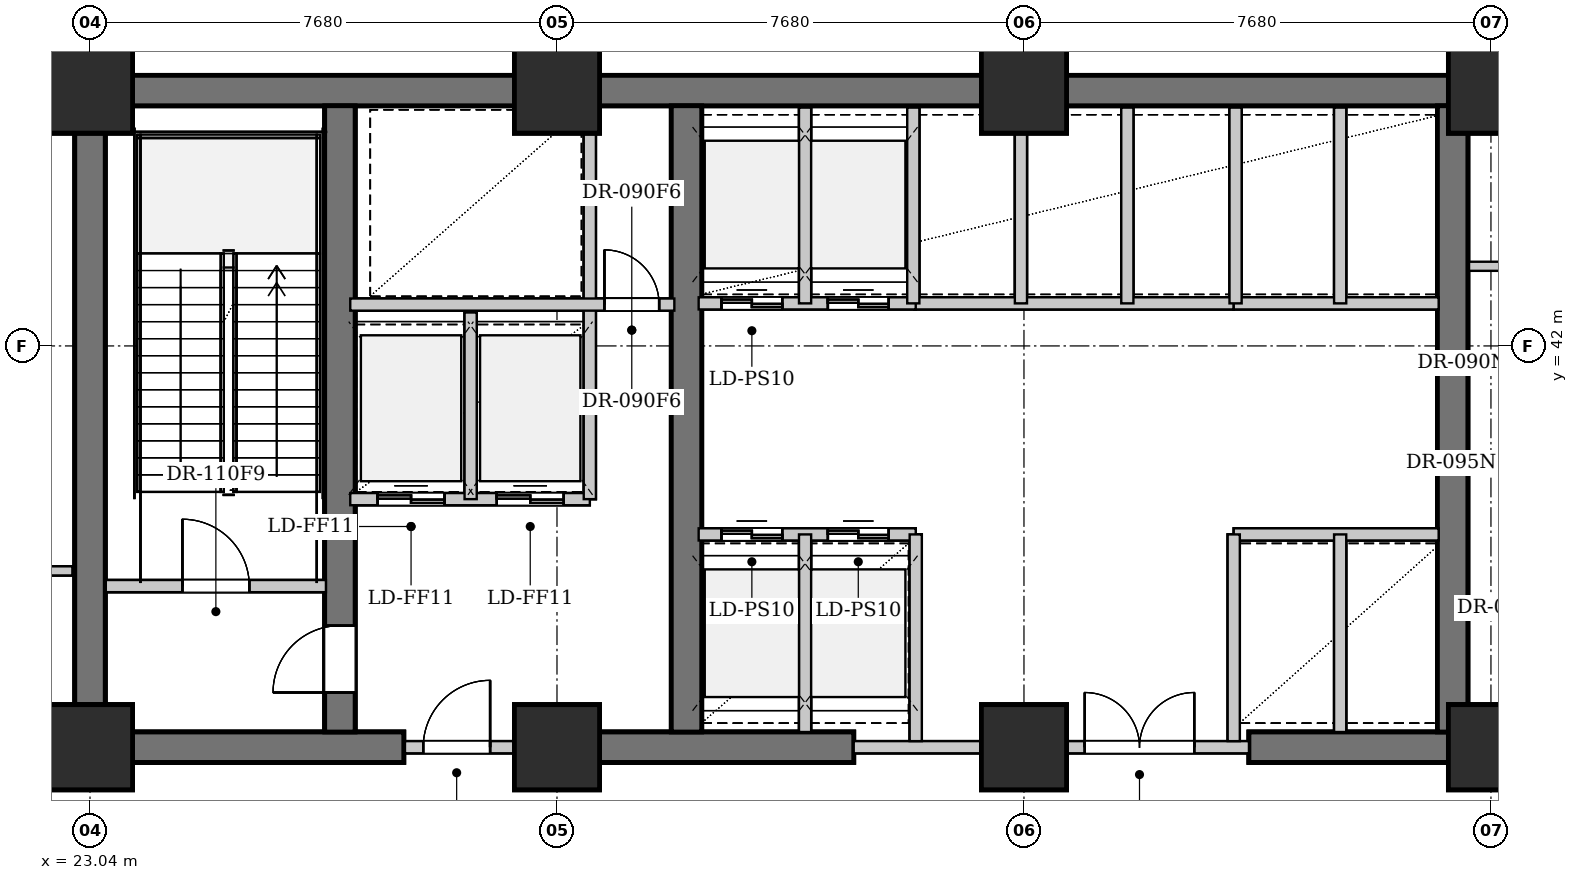
"""IFC4 building model, lengths in metres.
Left out: names, types, materials, properties, quantities, classifications, styles, units other than length and angle.
Written with IfcOpenShell. Run it as: python <this file> out.ifc"""

import sys

from ifc_helpers import new_model, si_unit, direction, frame, frame_2d, origin, origin_2d, place, context, subcontext, project, spatial, rectangle, extrude, element, fill, save


model = new_model("IFC4")
c1 = context("Model", 3, precision=1e-05, world=origin(), true_north=direction((0.0, 1.0)))
c2 = subcontext(c1, "Body", "Model", "MODEL_VIEW")
j1 = project(units=[si_unit("LENGTHUNIT", "METRE"), si_unit("PLANEANGLEUNIT", "RADIAN")], contexts=[c1])
p1 = place(None, origin())
s1 = spatial("IfcSite", under=j1, at=p1, CompositionType="ELEMENT")
p2 = place(p1, origin())
s2 = spatial("IfcBuilding", under=s1, at=p2, CompositionType="ELEMENT")
p3 = place(p2, frame((0.0, 0.0, 10.4)))
s3 = spatial("IfcBuildingStorey", under=s2, at=p3, CompositionType="ELEMENT", Elevation=10.4)
p4 = place(p3, frame((22.79, 46.2, 0.0), z_axis=(0.0, 0.0, 1.0), x_axis=(1.0, 0.0, 0.0)))
e1 = element("IfcWall", 1, at=p4, inside=s3, PredefinedType="SHEAR", context=c2, shape_type="SweptSolid", body=[
    extrude(rectangle(XDim=31.22, YDim=0.5, at=frame_2d((15.61, 0.0))), origin(), (0.0, 0.0, 1.0), 4.94),
])
p5 = place(p3, frame((22.79, 35.4, 0.0), z_axis=(0.0, 0.0, 1.0), x_axis=(1.0, 0.0, 0.0)))
e2 = element("IfcWall", 2, at=p5, inside=s3, PredefinedType="SHEAR", context=c2, shape_type="SweptSolid", body=[
    extrude(rectangle(XDim=5.41, YDim=0.5, at=frame_2d((2.705, 0.0))), origin(), (0.0, 0.0, 1.0), 4.94),
])
p6 = place(p3, frame((30.72, 35.4, 0.0), z_axis=(0.0, 0.0, 1.0), x_axis=(1.0, 0.0, 0.0)))
e3 = element("IfcWall", 3, at=p6, inside=s3, PredefinedType="SHEAR", context=c2, shape_type="SweptSolid", body=[
    extrude(rectangle(XDim=4.88, YDim=0.5, at=frame_2d((2.44, 0.0))), origin(), (0.0, 0.0, 1.0), 4.94),
])
p7 = place(p3, frame((42.1, 35.4, 0.0), z_axis=(0.0, 0.0, 1.0), x_axis=(1.0, 0.0, 0.0)))
e4 = element("IfcWall", 4, at=p7, inside=s3, PredefinedType="SHEAR", context=c2, shape_type="SweptSolid", body=[
    extrude(rectangle(XDim=8.05, YDim=0.5, at=frame_2d((4.025, 0.0))), origin(), (0.0, 0.0, 1.0), 4.94),
])
p8 = place(p7, frame((4.85, 0.0, 0.0)))
e5 = element("IfcOpeningElement", 5, at=p8, cuts=e4, PredefinedType="OPENING", context=c2, shape_type="SweptSolid", body=[
    extrude(rectangle(XDim=0.9, YDim=2.15, at=frame_2d((0.45, 1.075))), frame((0.0, 0.26, 0.0), z_axis=(0.0, -1.0, 0.0), x_axis=(1.0, 0.0, 0.0)), (0.0, 0.0, 1.0), 0.52),
])
p9 = place(p3, frame((23.04, 35.65, 0.0), z_axis=(0.0, 0.0, 1.0), x_axis=(0.0, 1.0, 0.0)))
e6 = element("IfcWall", 6, at=p9, inside=s3, PredefinedType="SHEAR", context=c2, shape_type="SweptSolid", body=[
    extrude(rectangle(XDim=10.3, YDim=0.5, at=frame_2d((5.15, 0.0))), origin(), (0.0, 0.0, 1.0), 4.94),
])
p10 = place(p3, frame((27.15, 35.65, 0.0), z_axis=(0.0, 0.0, 1.0), x_axis=(0.0, 1.0, 0.0)))
e7 = element("IfcWall", 7, at=p10, inside=s3, PredefinedType="SHEAR", context=c2, shape_type="SweptSolid", body=[
    extrude(rectangle(XDim=10.3, YDim=0.5, at=frame_2d((5.15, 0.0))), origin(), (0.0, 0.0, 1.0), 4.94),
])
p11 = place(p10, frame((0.65, 0.0, 0.0)))
e8 = element("IfcOpeningElement", 8, at=p11, cuts=e7, PredefinedType="OPENING", context=c2, shape_type="SweptSolid", body=[
    extrude(rectangle(XDim=1.1, YDim=2.15, at=frame_2d((0.55, 1.075))), frame((0.0, 0.26, 0.0), z_axis=(0.0, -1.0, 0.0), x_axis=(1.0, 0.0, 0.0)), (0.0, 0.0, 1.0), 0.52),
])
for number, where, z_axis, x_axis in (
    (9, (32.85, 35.65, 0.0), (0.0, 0.0, 1.0), (0.0, 1.0, 0.0)),
    (10, (45.45, 35.65, 0.0), (0.0, 0.0, 1.0), (0.0, 1.0, 0.0)),
):
    element("IfcWall", number, at=place(p3, frame(where, z_axis=z_axis, x_axis=x_axis)), inside=s3, PredefinedType="SHEAR", context=c2, shape_type="SweptSolid", body=[
        extrude(rectangle(XDim=10.3, YDim=0.5, at=frame_2d((5.15, 0.0))), origin(), (0.0, 0.0, 1.0), 4.94),
    ])
for number, where, z_axis, x_axis in (
    (11, (23.04, 35.4, 0.0), (0.0, 0.0, 1.0), (1.0, 0.0, 0.0)),
    (12, (23.04, 46.2, 0.0), (0.0, 0.0, 1.0), (1.0, 0.0, 0.0)),
    (13, (30.72, 35.4, 0.0), (0.0, 0.0, 1.0), (1.0, 0.0, 0.0)),
    (14, (30.72, 46.2, 0.0), (0.0, 0.0, 1.0), (1.0, 0.0, 0.0)),
    (15, (38.4, 35.4, 0.0), (0.0, 0.0, 1.0), (1.0, 0.0, 0.0)),
    (16, (38.4, 46.2, 0.0), (0.0, 0.0, 1.0), (1.0, 0.0, 0.0)),
    (17, (46.08, 35.4, 0.0), (0.0, 0.0, 1.0), (1.0, 0.0, 0.0)),
    (18, (46.08, 46.2, 0.0), (0.0, 0.0, 1.0), (1.0, 0.0, 0.0)),
):
    element("IfcColumn", number, at=place(p3, frame(where, z_axis=z_axis, x_axis=x_axis)), inside=s3, PredefinedType="COLUMN", context=c2, shape_type="SweptSolid", body=[
        extrude(rectangle(XDim=1.4, YDim=1.4, at=origin_2d()), origin(), (0.0, 0.0, 1.0), 5.2),
    ])
p12 = place(p3, frame((23.3, 38.05, 0.0), z_axis=(0.0, 0.0, 1.0), x_axis=(1.0, 0.0, 0.0)))
e19 = element("IfcWall", 19, at=p12, inside=s3, PredefinedType="PARTITIONING", context=c2, shape_type="SweptSolid", body=[
    extrude(rectangle(XDim=3.62, YDim=0.2, at=frame_2d((1.81, 0.0))), origin(), (0.0, 0.0, 1.0), 4.94),
])
p13 = place(p12, frame((1.26, 0.0, 0.0)))
e20 = element("IfcOpeningElement", 20, at=p13, cuts=e19, PredefinedType="OPENING", context=c2, shape_type="SweptSolid", body=[
    extrude(rectangle(XDim=1.1, YDim=2.15, at=frame_2d((0.55, 1.075))), frame((0.0, 0.11, 0.0), z_axis=(0.0, -1.0, 0.0), x_axis=(1.0, 0.0, 0.0)), (0.0, 0.0, 1.0), 0.22),
])
p14 = place(p3, frame((28.22, 35.4, 0.0), z_axis=(0.0, 0.0, 1.0), x_axis=(1.0, 0.0, 0.0)))
e21 = element("IfcWall", 21, at=p14, inside=s3, PredefinedType="PARTITIONING", context=c2, shape_type="SweptSolid", body=[
    extrude(rectangle(XDim=2.5, YDim=0.2, at=frame_2d((1.25, 0.0))), origin(), (0.0, 0.0, 1.0), 4.035),
])
p15 = place(p14, frame((0.3, 0.0, 0.0)))
e22 = element("IfcOpeningElement", 22, at=p15, cuts=e21, PredefinedType="OPENING", context=c2, shape_type="SweptSolid", body=[
    extrude(rectangle(XDim=1.1, YDim=2.15, at=frame_2d((0.55, 1.075))), frame((0.0, 0.11, 0.0), z_axis=(0.0, -1.0, 0.0), x_axis=(1.0, 0.0, 0.0)), (0.0, 0.0, 1.0), 0.22),
])
p16 = place(p3, frame((27.32, 39.48, 0.0), z_axis=(0.0, 0.0, 1.0), x_axis=(1.0, 0.0, 0.0)))
e23 = element("IfcWall", 23, at=p16, inside=s3, PredefinedType="PARTITIONING", context=c2, shape_type="SweptSolid", body=[
    extrude(rectangle(XDim=3.94, YDim=0.2, at=frame_2d((1.97, 0.0))), origin(), (0.0, 0.0, 1.0), 4.94),
])
p17 = place(p16, frame((0.45, 0.0, 0.0)))
e24 = element("IfcOpeningElement", 24, at=p17, cuts=e23, PredefinedType="OPENING", context=c2, shape_type="SweptSolid", body=[
    extrude(rectangle(XDim=1.1, YDim=2.2, at=frame_2d((0.55, 1.1))), frame((0.0, 0.11, 0.0), z_axis=(0.0, -1.0, 0.0), x_axis=(1.0, 0.0, 0.0)), (0.0, 0.0, 1.0), 0.22),
])
p18 = place(p16, frame((2.41, 0.0, 0.0)))
e25 = element("IfcOpeningElement", 25, at=p18, cuts=e23, PredefinedType="OPENING", context=c2, shape_type="SweptSolid", body=[
    extrude(rectangle(XDim=1.1, YDim=2.2, at=frame_2d((0.55, 1.1))), frame((0.0, 0.11, 0.0), z_axis=(0.0, -1.0, 0.0), x_axis=(1.0, 0.0, 0.0)), (0.0, 0.0, 1.0), 0.22),
])
p19 = place(p3, frame((29.3, 39.48, 0.0), z_axis=(0.0, 0.0, 1.0), x_axis=(0.0, 1.0, 0.0)))
e26 = element("IfcWall", 26, at=p19, inside=s3, PredefinedType="PARTITIONING", context=c2, shape_type="SweptSolid", body=[
    extrude(rectangle(XDim=3.07, YDim=0.2, at=frame_2d((1.535, 0.0))), origin(), (0.0, 0.0, 1.0), 4.94),
])
p20 = place(p3, frame((31.26, 39.48, 0.0), z_axis=(0.0, 0.0, 1.0), x_axis=(0.0, 1.0, 0.0)))
e27 = element("IfcWall", 27, at=p20, inside=s3, PredefinedType="PARTITIONING", context=c2, shape_type="SweptSolid", body=[
    extrude(rectangle(XDim=6.44, YDim=0.2, at=frame_2d((3.22, 0.0))), origin(), (0.0, 0.0, 1.0), 4.94),
])
p21 = place(p3, frame((27.32, 42.68, 0.0), z_axis=(0.0, 0.0, 1.0), x_axis=(1.0, 0.0, 0.0)))
e28 = element("IfcWall", 28, at=p21, inside=s3, PredefinedType="PARTITIONING", context=c2, shape_type="SweptSolid", body=[
    extrude(rectangle(XDim=5.33, YDim=0.2, at=frame_2d((2.665, 0.0))), origin(), (0.0, 0.0, 1.0), 4.94),
])
p22 = place(p21, frame((4.18, 0.0, 0.0)))
e29 = element("IfcOpeningElement", 29, at=p22, cuts=e28, PredefinedType="OPENING", context=c2, shape_type="SweptSolid", body=[
    extrude(rectangle(XDim=0.9, YDim=2.15, at=frame_2d((0.45, 1.075))), frame((0.0, 0.11, 0.0), z_axis=(0.0, -1.0, 0.0), x_axis=(1.0, 0.0, 0.0)), (0.0, 0.0, 1.0), 0.22),
])
p23 = place(p3, frame((35.6, 35.4, 0.0), z_axis=(0.0, 0.0, 1.0), x_axis=(1.0, 0.0, 0.0)))
e30 = element("IfcWall", 30, at=p23, inside=s3, PredefinedType="PARTITIONING", context=c2, shape_type="SweptSolid", body=[
    extrude(rectangle(XDim=6.5, YDim=0.2, at=frame_2d((3.25, 0.0))), origin(), (0.0, 0.0, 1.0), 4.035),
])
p24 = place(p23, frame((3.8, 0.0, 0.0)))
e31 = element("IfcOpeningElement", 31, at=p24, cuts=e30, PredefinedType="OPENING", context=c2, shape_type="SweptSolid", body=[
    extrude(rectangle(XDim=1.8, YDim=2.3, at=frame_2d((0.9, 1.15))), frame((0.0, 0.11, 0.0), z_axis=(0.0, -1.0, 0.0), x_axis=(1.0, 0.0, 0.0)), (0.0, 0.0, 1.0), 0.22),
])
p25 = place(p3, frame((36.6, 42.7, 0.0), z_axis=(0.0, 0.0, 1.0), x_axis=(1.0, 0.0, 0.0)))
e32 = element("IfcWall", 32, at=p25, inside=s3, PredefinedType="PARTITIONING", context=c2, shape_type="SweptSolid", body=[
    extrude(rectangle(XDim=5.25, YDim=0.2, at=frame_2d((2.625, 0.0))), origin(), (0.0, 0.0, 1.0), 4.94),
])
p26 = place(p3, frame((38.35, 42.7, 0.0), z_axis=(0.0, 0.0, 1.0), x_axis=(0.0, 1.0, 0.0)))
e33 = element("IfcWall", 33, at=p26, inside=s3, PredefinedType="PARTITIONING", context=c2, shape_type="SweptSolid", body=[
    extrude(rectangle(XDim=3.22, YDim=0.2, at=frame_2d((1.61, 0.0))), origin(), (0.0, 0.0, 1.0), 4.035),
])
p27 = place(p3, frame((40.1, 42.7, 0.0), z_axis=(0.0, 0.0, 1.0), x_axis=(0.0, 1.0, 0.0)))
e34 = element("IfcWall", 34, at=p27, inside=s3, PredefinedType="PARTITIONING", context=c2, shape_type="SweptSolid", body=[
    extrude(rectangle(XDim=3.22, YDim=0.2, at=frame_2d((1.61, 0.0))), origin(), (0.0, 0.0, 1.0), 4.94),
])
p28 = place(p3, frame((33.05, 38.9, 0.0), z_axis=(0.0, 0.0, 1.0), x_axis=(1.0, 0.0, 0.0)))
e35 = element("IfcWall", 35, at=p28, inside=s3, PredefinedType="PARTITIONING", context=c2, shape_type="SweptSolid", body=[
    extrude(rectangle(XDim=3.57, YDim=0.2, at=frame_2d((1.785, 0.0))), origin(), (0.0, 0.0, 1.0), 4.94),
])
p29 = place(p28, frame((0.375, 0.0, 0.0)))
e36 = element("IfcOpeningElement", 36, at=p29, cuts=e35, PredefinedType="OPENING", context=c2, shape_type="SweptSolid", body=[
    extrude(rectangle(XDim=1.0, YDim=2.2, at=frame_2d((0.5, 1.1))), frame((0.0, 0.11, 0.0), z_axis=(0.0, -1.0, 0.0), x_axis=(1.0, 0.0, 0.0)), (0.0, 0.0, 1.0), 0.22),
])
p30 = place(p28, frame((2.125, 0.0, 0.0)))
e37 = element("IfcOpeningElement", 37, at=p30, cuts=e35, PredefinedType="OPENING", context=c2, shape_type="SweptSolid", body=[
    extrude(rectangle(XDim=1.0, YDim=2.2, at=frame_2d((0.5, 1.1))), frame((0.0, 0.11, 0.0), z_axis=(0.0, -1.0, 0.0), x_axis=(1.0, 0.0, 0.0)), (0.0, 0.0, 1.0), 0.22),
])
p31 = place(p3, frame((33.05, 42.7, 0.0), z_axis=(0.0, 0.0, 1.0), x_axis=(1.0, 0.0, 0.0)))
e38 = element("IfcWall", 38, at=p31, inside=s3, PredefinedType="PARTITIONING", context=c2, shape_type="SweptSolid", body=[
    extrude(rectangle(XDim=3.57, YDim=0.2, at=frame_2d((1.785, 0.0))), origin(), (0.0, 0.0, 1.0), 4.94),
])
p32 = place(p31, frame((0.375, 0.0, 0.0)))
e39 = element("IfcOpeningElement", 39, at=p32, cuts=e38, PredefinedType="OPENING", context=c2, shape_type="SweptSolid", body=[
    extrude(rectangle(XDim=1.0, YDim=2.2, at=frame_2d((0.5, 1.1))), frame((0.0, 0.11, 0.0), z_axis=(0.0, -1.0, 0.0), x_axis=(1.0, 0.0, 0.0)), (0.0, 0.0, 1.0), 0.22),
])
p33 = place(p31, frame((2.125, 0.0, 0.0)))
e40 = element("IfcOpeningElement", 40, at=p33, cuts=e38, PredefinedType="OPENING", context=c2, shape_type="SweptSolid", body=[
    extrude(rectangle(XDim=1.0, YDim=2.2, at=frame_2d((0.5, 1.1))), frame((0.0, 0.11, 0.0), z_axis=(0.0, -1.0, 0.0), x_axis=(1.0, 0.0, 0.0)), (0.0, 0.0, 1.0), 0.22),
])
p34 = place(p3, frame((34.8, 35.65, 0.0), z_axis=(0.0, 0.0, 1.0), x_axis=(0.0, 1.0, 0.0)))
e41 = element("IfcWall", 41, at=p34, inside=s3, PredefinedType="PARTITIONING", context=c2, shape_type="SweptSolid", body=[
    extrude(rectangle(XDim=3.25, YDim=0.2, at=frame_2d((1.625, 0.0))), origin(), (0.0, 0.0, 1.0), 4.94),
])
p35 = place(p3, frame((34.8, 42.7, 0.0), z_axis=(0.0, 0.0, 1.0), x_axis=(0.0, 1.0, 0.0)))
e42 = element("IfcWall", 42, at=p35, inside=s3, PredefinedType="PARTITIONING", context=c2, shape_type="SweptSolid", body=[
    extrude(rectangle(XDim=3.22, YDim=0.2, at=frame_2d((1.61, 0.0))), origin(), (0.0, 0.0, 1.0), 4.94),
])
p36 = place(p3, frame((36.62, 35.5, 0.0), z_axis=(0.0, 0.0, 1.0), x_axis=(0.0, 1.0, 0.0)))
e43 = element("IfcWall", 43, at=p36, inside=s3, PredefinedType="PARTITIONING", context=c2, shape_type="SweptSolid", body=[
    extrude(rectangle(XDim=3.4, YDim=0.2, at=frame_2d((1.7, 0.0))), origin(), (0.0, 0.0, 1.0), 4.94),
])
p37 = place(p3, frame((36.58, 42.7, 0.0), z_axis=(0.0, 0.0, 1.0), x_axis=(0.0, 1.0, 0.0)))
e44 = element("IfcWall", 44, at=p37, inside=s3, PredefinedType="PARTITIONING", context=c2, shape_type="SweptSolid", body=[
    extrude(rectangle(XDim=3.22, YDim=0.2, at=frame_2d((1.61, 0.0))), origin(), (0.0, 0.0, 1.0), 4.94),
])
for number, where, z_axis, x_axis in (
    (45, (41.85, 38.9, 0.0), (0.0, 0.0, 1.0), (1.0, 0.0, 0.0)),
    (46, (41.85, 42.7, 0.0), (0.0, 0.0, 1.0), (1.0, 0.0, 0.0)),
):
    element("IfcWall", number, at=place(p3, frame(where, z_axis=z_axis, x_axis=x_axis)), inside=s3, PredefinedType="PARTITIONING", context=c2, shape_type="SweptSolid", body=[
        extrude(rectangle(XDim=3.37, YDim=0.2, at=frame_2d((1.685, 0.0))), origin(), (0.0, 0.0, 1.0), 4.94),
    ])
p38 = place(p3, frame((43.6, 35.65, 0.0), z_axis=(0.0, 0.0, 1.0), x_axis=(0.0, 1.0, 0.0)))
e47 = element("IfcWall", 47, at=p38, inside=s3, PredefinedType="PARTITIONING", context=c2, shape_type="SweptSolid", body=[
    extrude(rectangle(XDim=3.25, YDim=0.2, at=frame_2d((1.625, 0.0))), origin(), (0.0, 0.0, 1.0), 4.94),
])
p39 = place(p3, frame((43.6, 42.7, 0.0), z_axis=(0.0, 0.0, 1.0), x_axis=(0.0, 1.0, 0.0)))
e48 = element("IfcWall", 48, at=p39, inside=s3, PredefinedType="PARTITIONING", context=c2, shape_type="SweptSolid", body=[
    extrude(rectangle(XDim=3.22, YDim=0.2, at=frame_2d((1.61, 0.0))), origin(), (0.0, 0.0, 1.0), 4.94),
])
p40 = place(p3, frame((41.85, 35.5, 0.0), z_axis=(0.0, 0.0, 1.0), x_axis=(0.0, 1.0, 0.0)))
e49 = element("IfcWall", 49, at=p40, inside=s3, PredefinedType="PARTITIONING", context=c2, shape_type="SweptSolid", body=[
    extrude(rectangle(XDim=3.4, YDim=0.2, at=frame_2d((1.7, 0.0))), origin(), (0.0, 0.0, 1.0), 4.94),
])
p41 = place(p3, frame((41.88, 42.7, 0.0), z_axis=(0.0, 0.0, 1.0), x_axis=(0.0, 1.0, 0.0)))
e50 = element("IfcWall", 50, at=p41, inside=s3, PredefinedType="PARTITIONING", context=c2, shape_type="SweptSolid", body=[
    extrude(rectangle(XDim=3.22, YDim=0.2, at=frame_2d((1.61, 0.0))), origin(), (0.0, 0.0, 1.0), 4.94),
])
p42 = place(p3, frame((12.65, 38.3, 0.0), z_axis=(0.0, 0.0, 1.0), x_axis=(1.0, 0.0, 0.0)))
e51 = element("IfcWall", 51, at=p42, inside=s3, PredefinedType="PARTITIONING", context=c2, shape_type="SweptSolid", body=[
    extrude(rectangle(XDim=10.1, YDim=0.15, at=frame_2d((5.05, 0.0))), origin(), (0.0, 0.0, 1.0), 4.94),
])
p43 = place(p42, frame((4.5, 0.0, 0.0)))
e52 = element("IfcOpeningElement", 52, at=p43, cuts=e51, PredefinedType="OPENING", context=c2, shape_type="SweptSolid", body=[
    extrude(rectangle(XDim=1.1, YDim=2.15, at=frame_2d((0.55, 1.075))), frame((0.0, 0.085, 0.0), z_axis=(0.0, -1.0, 0.0), x_axis=(1.0, 0.0, 0.0)), (0.0, 0.0, 1.0), 0.17),
])
p44 = place(p3, frame((12.65, 46.15, 0.0), z_axis=(0.0, 0.0, 1.0), x_axis=(1.0, 0.0, 0.0)))
e53 = element("IfcWall", 53, at=p44, inside=s3, PredefinedType="PARTITIONING", context=c2, shape_type="SweptSolid", body=[
    extrude(rectangle(XDim=10.1, YDim=0.15, at=frame_2d((5.05, 0.0))), origin(), (0.0, 0.0, 1.0), 4.94),
])
p45 = place(p13, origin())
e54 = element("IfcDoor", 54, at=p45, inside=s3, OperationType="SINGLE_SWING_LEFT", PredefinedType="DOOR", context=c2, shape_type="SweptSolid", body=[
    extrude(rectangle(XDim=1.1, YDim=2.15, at=frame_2d((0.55, 1.075))), frame((0.0, 0.025, 0.0), z_axis=(0.0, -1.0, 0.0), x_axis=(1.0, 0.0, 0.0)), (0.0, 0.0, 1.0), 0.05),
])
fill(e20, e54)
p46 = place(p15, origin())
e55 = element("IfcDoor", 55, at=p46, inside=s3, OperationType="SINGLE_SWING_RIGHT", PredefinedType="DOOR", context=c2, shape_type="SweptSolid", body=[
    extrude(rectangle(XDim=1.1, YDim=2.15, at=frame_2d((0.55, 1.075))), frame((0.0, 0.025, 0.0), z_axis=(0.0, -1.0, 0.0), x_axis=(1.0, 0.0, 0.0)), (0.0, 0.0, 1.0), 0.05),
])
fill(e22, e55)
p47 = place(p17, origin())
e56 = element("IfcDoor", 56, at=p47, inside=s3, OperationType="DOUBLE_DOOR_SLIDING", PredefinedType="DOOR", context=c2, shape_type="SweptSolid", body=[
    extrude(rectangle(XDim=1.1, YDim=2.2, at=frame_2d((0.55, 1.1))), frame((0.0, 0.025, 0.0), z_axis=(0.0, -1.0, 0.0), x_axis=(1.0, 0.0, 0.0)), (0.0, 0.0, 1.0), 0.05),
])
fill(e24, e56)
p48 = place(p18, origin())
e57 = element("IfcDoor", 57, at=p48, inside=s3, OperationType="DOUBLE_DOOR_SLIDING", PredefinedType="DOOR", context=c2, shape_type="SweptSolid", body=[
    extrude(rectangle(XDim=1.1, YDim=2.2, at=frame_2d((0.55, 1.1))), frame((0.0, 0.025, 0.0), z_axis=(0.0, -1.0, 0.0), x_axis=(1.0, 0.0, 0.0)), (0.0, 0.0, 1.0), 0.05),
])
fill(e25, e57)
p49 = place(p22, origin())
e58 = element("IfcDoor", 58, at=p49, inside=s3, OperationType="SINGLE_SWING_LEFT", PredefinedType="DOOR", context=c2, shape_type="SweptSolid", body=[
    extrude(rectangle(XDim=0.9, YDim=2.15, at=frame_2d((0.45, 1.075))), frame((0.0, 0.025, 0.0), z_axis=(0.0, -1.0, 0.0), x_axis=(1.0, 0.0, 0.0)), (0.0, 0.0, 1.0), 0.05),
])
fill(e29, e58)
p50 = place(p24, origin())
e59 = element("IfcDoor", 59, at=p50, inside=s3, OperationType="DOUBLE_DOOR_SINGLE_SWING", PredefinedType="DOOR", context=c2, shape_type="SweptSolid", body=[
    extrude(rectangle(XDim=1.8, YDim=2.3, at=frame_2d((0.9, 1.15))), frame((0.0, 0.025, 0.0), z_axis=(0.0, -1.0, 0.0), x_axis=(1.0, 0.0, 0.0)), (0.0, 0.0, 1.0), 0.05),
])
fill(e31, e59)
p51 = place(p29, origin())
e60 = element("IfcDoor", 60, at=p51, inside=s3, OperationType="DOUBLE_DOOR_SLIDING", PredefinedType="DOOR", context=c2, shape_type="SweptSolid", body=[
    extrude(rectangle(XDim=1.0, YDim=2.2, at=frame_2d((0.5, 1.1))), frame((0.0, 0.025, 0.0), z_axis=(0.0, -1.0, 0.0), x_axis=(1.0, 0.0, 0.0)), (0.0, 0.0, 1.0), 0.05),
])
fill(e36, e60)
p52 = place(p30, origin())
e61 = element("IfcDoor", 61, at=p52, inside=s3, OperationType="DOUBLE_DOOR_SLIDING", PredefinedType="DOOR", context=c2, shape_type="SweptSolid", body=[
    extrude(rectangle(XDim=1.0, YDim=2.2, at=frame_2d((0.5, 1.1))), frame((0.0, 0.025, 0.0), z_axis=(0.0, -1.0, 0.0), x_axis=(1.0, 0.0, 0.0)), (0.0, 0.0, 1.0), 0.05),
])
fill(e37, e61)
p53 = place(p32, origin())
e62 = element("IfcDoor", 62, at=p53, inside=s3, OperationType="DOUBLE_DOOR_SLIDING", PredefinedType="DOOR", context=c2, shape_type="SweptSolid", body=[
    extrude(rectangle(XDim=1.0, YDim=2.2, at=frame_2d((0.5, 1.1))), frame((0.0, 0.025, 0.0), z_axis=(0.0, -1.0, 0.0), x_axis=(1.0, 0.0, 0.0)), (0.0, 0.0, 1.0), 0.05),
])
fill(e39, e62)
p54 = place(p33, origin())
e63 = element("IfcDoor", 63, at=p54, inside=s3, OperationType="DOUBLE_DOOR_SLIDING", PredefinedType="DOOR", context=c2, shape_type="SweptSolid", body=[
    extrude(rectangle(XDim=1.0, YDim=2.2, at=frame_2d((0.5, 1.1))), frame((0.0, 0.025, 0.0), z_axis=(0.0, -1.0, 0.0), x_axis=(1.0, 0.0, 0.0)), (0.0, 0.0, 1.0), 0.05),
])
fill(e40, e63)
p55 = place(p11, origin())
e64 = element("IfcDoor", 64, at=p55, inside=s3, OperationType="SINGLE_SWING_LEFT", PredefinedType="DOOR", context=c2, shape_type="SweptSolid", body=[
    extrude(rectangle(XDim=1.1, YDim=2.15, at=frame_2d((0.55, 1.075))), frame((0.0, 0.025, 0.0), z_axis=(0.0, -1.0, 0.0), x_axis=(1.0, 0.0, 0.0)), (0.0, 0.0, 1.0), 0.05),
])
fill(e8, e64)
save(model, sys.argv[1])
